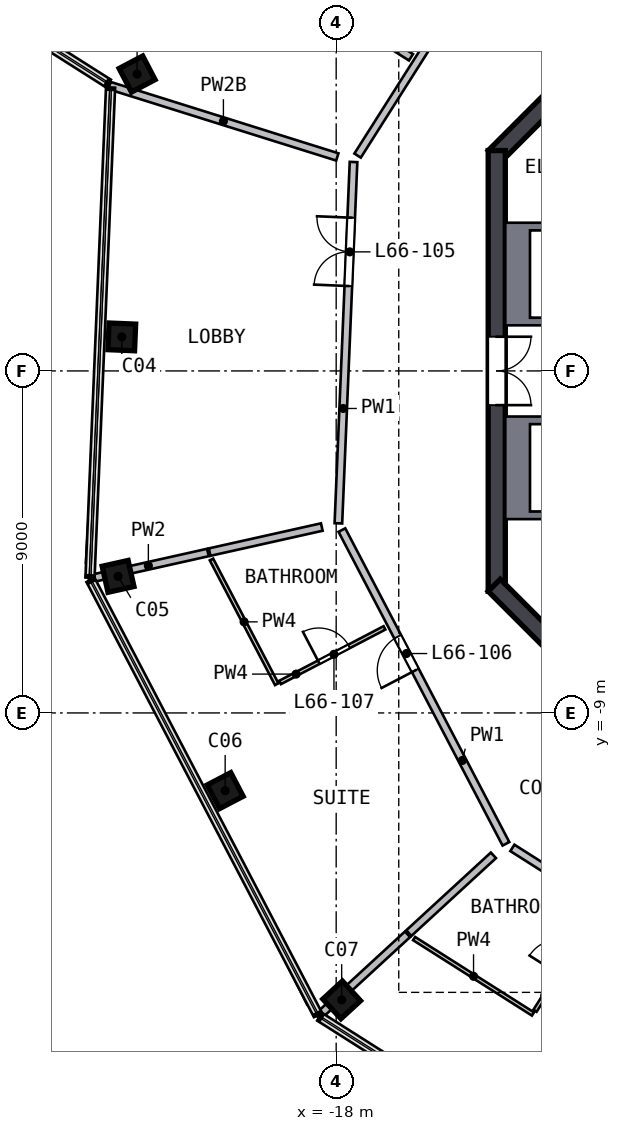
"""IFC4 building model, lengths in metres.
Left out: names, types, materials, properties, quantities, classifications, styles, units other than length and angle.
Written with IfcOpenShell. Run it as: python <this file> out.ifc"""

import sys

from ifc_helpers import new_model, si_unit, direction, frame, frame_2d, origin, origin_2d, place, context, subcontext, project, spatial, polyline, rectangle, outline, extrude, element, fill, save


model = new_model("IFC4")
c1 = context("Model", 3, precision=1e-05, world=origin(), true_north=direction((0.0, 1.0)))
c2 = subcontext(c1, "Body", "Model", "MODEL_VIEW")
j1 = project(units=[si_unit("LENGTHUNIT", "METRE"), si_unit("PLANEANGLEUNIT", "RADIAN")], contexts=[c1])
p1 = place(None, origin())
s1 = spatial("IfcSite", under=j1, at=p1, CompositionType="ELEMENT")
p2 = place(p1, origin())
s2 = spatial("IfcBuilding", under=s1, at=p2, CompositionType="ELEMENT")
p3 = place(p2, frame((0.0, 0.0, 269.0)))
s3 = spatial("IfcBuildingStorey", under=s2, at=p3, CompositionType="ELEMENT", Elevation=269.0)
p4 = place(p3, frame((-23.208, 7.906, 0.0), z_axis=(-0.02578506, -0.07771835, 0.996641856), x_axis=(-0.465171483, 0.883393066, 0.056852295)))
e1 = element("IfcColumn", 1, at=p4, inside=s3, PredefinedType="COLUMN", context=c2, shape_type="SweptSolid", body=[
    extrude(rectangle(XDim=0.7, YDim=0.7, at=origin_2d()), origin(), (0.0, 0.0, 1.0), 4.706),
])
p5 = place(p3, frame((-23.638, 0.991, 0.0), z_axis=(-0.002594671, -0.078981792, 0.996872682), x_axis=(-0.041129091, -0.996024088, -0.079021609)))
e2 = element("IfcColumn", 2, at=p5, inside=s3, PredefinedType="COLUMN", context=c2, shape_type="SweptSolid", body=[
    extrude(rectangle(XDim=0.7, YDim=0.7, at=origin_2d()), origin(), (0.0, 0.0, 1.0), 4.705),
])
p6 = place(p3, frame((-23.762, -5.311, 0.0), z_axis=(0.018418724, -0.079226457, 0.99668647), x_axis=(-0.217497759, 0.972665981, 0.081336422)))
e3 = element("IfcColumn", 3, at=p6, inside=s3, PredefinedType="COLUMN", context=c2, shape_type="SweptSolid", body=[
    extrude(rectangle(XDim=0.7, YDim=0.7, at=origin_2d()), origin(), (0.0, 0.0, 1.0), 4.706),
])
p7 = place(p3, frame((-20.966, -10.961, 0.0), z_axis=(0.037207513, -0.069744627, 0.996870748), x_axis=(0.461786436, -0.88346195, -0.079046004)))
e4 = element("IfcColumn", 4, at=p7, inside=s3, PredefinedType="COLUMN", context=c2, shape_type="SweptSolid", body=[
    extrude(rectangle(XDim=0.7, YDim=0.7, at=origin_2d()), origin(), (0.0, 0.0, 1.0), 4.705),
])
p8 = place(p3, frame((-17.923, -16.481, 0.0), z_axis=(0.055567624, -0.059355146, 0.996689122), x_axis=(-0.675008632, 0.733316452, 0.081303918)))
e5 = element("IfcColumn", 5, at=p8, inside=s3, PredefinedType="COLUMN", context=c2, shape_type="SweptSolid", body=[
    extrude(rectangle(XDim=0.7, YDim=0.7, at=origin_2d()), origin(), (0.0, 0.0, 1.0), 4.706),
])
p9 = place(p3, frame((-5.64, 13.841, 0.0), z_axis=(0.0, 0.0, 1.0), x_axis=(-0.707106781, -0.707106781, 0.0)))
e6 = element("IfcWall", 6, at=p9, inside=s3, PredefinedType="SHEAR", context=c2, shape_type="SweptSolid", body=[
    extrude(rectangle(XDim=11.598, YDim=0.45, at=frame_2d((5.799, 0.0))), origin(), (0.0, 0.0, 1.0), 5.0),
])
p10 = place(p3, frame((-13.775, 5.799, 0.0), z_axis=(0.0, 0.0, 1.0), x_axis=(0.0, -1.0, 0.0)))
e7 = element("IfcWall", 7, at=p10, inside=s3, PredefinedType="SHEAR", context=c2, shape_type="SweptSolid", body=[
    extrude(rectangle(XDim=11.598, YDim=0.45, at=frame_2d((5.799, 0.0))), origin(), (0.0, 0.0, 1.0), 5.0),
])
p11 = place(p10, frame((4.899, 0.0, 0.0)))
e8 = element("IfcOpeningElement", 8, at=p11, cuts=e7, PredefinedType="OPENING", context=c2, shape_type="SweptSolid", body=[
    extrude(rectangle(XDim=1.8, YDim=2.1, at=frame_2d((0.9, 1.05))), frame((0.0, 0.235, 0.0), z_axis=(0.0, -1.0, 0.0), x_axis=(1.0, 0.0, 0.0)), (0.0, 0.0, 1.0), 0.47),
])
p12 = place(p3, frame((-13.841, -5.64, 0.0), z_axis=(0.0, 0.0, 1.0), x_axis=(0.707106781, -0.707106781, 0.0)))
e9 = element("IfcWall", 9, at=p12, inside=s3, PredefinedType="SHEAR", context=c2, shape_type="SweptSolid", body=[
    extrude(rectangle(XDim=11.598, YDim=0.45, at=frame_2d((5.799, 0.0))), origin(), (0.0, 0.0, 1.0), 5.0),
])
p13 = place(p12, frame((2.099, 0.0, 0.0)))
e10 = element("IfcOpeningElement", 10, at=p13, cuts=e9, PredefinedType="OPENING", context=c2, shape_type="SweptSolid", body=[
    extrude(rectangle(XDim=1.2, YDim=2.1, at=frame_2d((0.6, 1.05))), frame((0.0, 0.235, 0.0), z_axis=(0.0, -1.0, 0.0), x_axis=(1.0, 0.0, 0.0)), (0.0, 0.0, 1.0), 0.47),
])
p14 = place(p3, origin())
e11 = element("IfcWall", 11, at=p14, inside=s3, PredefinedType="SOLIDWALL", context=c2, shape_type="SweptSolid", body=[
    extrude(outline(polyline([(-13.55, 3.9), (-9.9, 3.9), (-9.9, 3.7), (-12.9, 3.7), (-12.9, 1.4), (-9.9, 1.4), (-9.9, 1.2), (-13.55, 1.2), (-13.55, 3.9)])), origin(), (0.0, 0.0, 1.0), 4.69),
])
p15 = place(p3, origin())
e12 = element("IfcWall", 12, at=p15, inside=s3, PredefinedType="SOLIDWALL", context=c2, shape_type="SweptSolid", body=[
    extrude(outline(polyline([(-13.55, -3.9), (-13.55, -1.2), (-9.9, -1.2), (-9.9, -1.4), (-12.9, -1.4), (-12.9, -3.7), (-9.9, -3.7), (-9.9, -3.9), (-13.55, -3.9)])), origin(), (0.0, 0.0, 1.0), 4.69),
])
p16 = place(p3, frame((-17.942, -4.01, 0.0), z_axis=(0.0, 0.0, 1.0), x_axis=(0.041867432, 0.999123175, 0.0)))
e13 = element("IfcWall", 13, at=p16, inside=s3, PredefinedType="SOLIDWALL", context=c2, shape_type="SweptSolid", body=[
    extrude(rectangle(XDim=9.517, YDim=0.2, at=frame_2d((4.758, 0.0))), origin(), (0.0, 0.0, 1.0), 4.69),
])
p17 = place(p16, frame((6.25, 0.0, 0.0)))
e14 = element("IfcOpeningElement", 14, at=p17, cuts=e13, PredefinedType="OPENING", context=c2, shape_type="SweptSolid", body=[
    extrude(rectangle(XDim=1.8, YDim=2.1, at=frame_2d((0.9, 1.05))), frame((0.0, 0.11, 0.0), z_axis=(0.0, -1.0, 0.0), x_axis=(1.0, 0.0, 0.0)), (0.0, 0.0, 1.0), 0.22),
])
p18 = place(p3, frame((-13.533, -12.444, 0.0), z_axis=(0.0, 0.0, 1.0), x_axis=(-0.463303791, 0.886199525, 0.0)))
e15 = element("IfcWall", 15, at=p18, inside=s3, PredefinedType="SOLIDWALL", context=c2, shape_type="SweptSolid", body=[
    extrude(rectangle(XDim=9.317, YDim=0.2, at=frame_2d((4.658, 0.0))), origin(), (0.0, 0.0, 1.0), 4.69),
])
p19 = place(p18, frame((5.15, 0.0, 0.0)))
e16 = element("IfcOpeningElement", 16, at=p19, cuts=e15, PredefinedType="OPENING", context=c2, shape_type="SweptSolid", body=[
    extrude(rectangle(XDim=1.0, YDim=2.1, at=frame_2d((0.5, 1.05))), frame((0.0, 0.11, 0.0), z_axis=(0.0, -1.0, 0.0), x_axis=(1.0, 0.0, 0.0)), (0.0, 0.0, 1.0), 0.22),
])
p20 = place(p3, frame((-17.436, 5.667, 0.0), z_axis=(0.0, 0.0, 1.0), x_axis=(0.535837373, 0.844321212, 0.0)))
e17 = element("IfcWall", 17, at=p20, inside=s3, PredefinedType="SOLIDWALL", context=c2, shape_type="SweptSolid", body=[
    extrude(rectangle(XDim=9.317, YDim=0.2, at=frame_2d((4.658, 0.0))), origin(), (0.0, 0.0, 1.0), 4.69),
])
p21 = place(p20, frame((3.637, 0.0, 0.0)))
e18 = element("IfcOpeningElement", 18, at=p21, cuts=e17, PredefinedType="OPENING", context=c2, shape_type="SweptSolid", body=[
    extrude(rectangle(XDim=1.8, YDim=2.1, at=frame_2d((0.9, 1.05))), frame((0.0, 0.11, 0.0), z_axis=(0.0, -1.0, 0.0), x_axis=(1.0, 0.0, 0.0)), (0.0, 0.0, 1.0), 0.22),
])
p22 = place(p3, frame((-5.498, -17.543, 0.0), z_axis=(0.0, 0.0, 1.0), x_axis=(-0.844333068, 0.535818692, 0.0)))
e19 = element("IfcWall", 19, at=p22, inside=s3, PredefinedType="SOLIDWALL", context=c2, shape_type="SweptSolid", body=[
    extrude(rectangle(XDim=9.316, YDim=0.2, at=frame_2d((4.658, 0.0))), origin(), (0.0, 0.0, 1.0), 4.69),
])
p23 = place(p22, frame((5.15, 0.0, 0.0)))
e20 = element("IfcOpeningElement", 20, at=p23, cuts=e19, PredefinedType="OPENING", context=c2, shape_type="SweptSolid", body=[
    extrude(rectangle(XDim=1.0, YDim=2.1, at=frame_2d((0.5, 1.05))), frame((0.0, 0.11, 0.0), z_axis=(0.0, -1.0, 0.0), x_axis=(1.0, 0.0, 0.0)), (0.0, 0.0, 1.0), 0.22),
])
p24 = place(p3, frame((-21.375, -4.778, 0.0), z_axis=(0.0, 0.0, 1.0), x_axis=(-0.975907203, -0.218185999, 0.0)))
e21 = element("IfcWall", 21, at=p24, inside=s3, PredefinedType="SOLIDWALL", context=c2, shape_type="SweptSolid", body=[
    extrude(rectangle(XDim=3.211, YDim=0.2, at=frame_2d((1.606, 0.0))), origin(), (0.0, 0.0, 1.0), 4.69),
])
p25 = place(p3, frame((-17.97, 5.632, 0.0), z_axis=(0.0, 0.0, 1.0), x_axis=(-0.954248725, 0.299013997, 0.0)))
e22 = element("IfcWall", 22, at=p25, inside=s3, PredefinedType="SOLIDWALL", context=c2, shape_type="SweptSolid", body=[
    extrude(rectangle(XDim=6.282, YDim=0.2, at=frame_2d((3.141, 0.0))), origin(), (0.0, 0.0, 1.0), 4.19),
])
p26 = place(p3, frame((-16.031, 8.253, 0.0), z_axis=(0.0, 0.0, 1.0), x_axis=(-0.844319523, 0.535840034, 0.0)))
e23 = element("IfcWall", 23, at=p26, inside=s3, PredefinedType="SOLIDWALL", context=c2, shape_type="SweptSolid", body=[
    extrude(rectangle(XDim=10.302, YDim=0.2, at=frame_2d((5.151, 0.0))), origin(), (0.0, 0.0, 1.0), 4.69),
])
p27 = place(p26, frame((2.95, 0.0, 0.0)))
e24 = element("IfcOpeningElement", 24, at=p27, cuts=e23, PredefinedType="OPENING", context=c2, shape_type="SweptSolid", body=[
    extrude(rectangle(XDim=1.0, YDim=2.1, at=frame_2d((0.5, 1.05))), frame((0.0, 0.11, 0.0), z_axis=(0.0, -1.0, 0.0), x_axis=(1.0, 0.0, 0.0)), (0.0, 0.0, 1.0), 0.22),
])
p28 = place(p3, frame((-18.378, -4.108, 0.0), z_axis=(0.0, 0.0, 1.0), x_axis=(-0.975928079, -0.218092604, 0.0)))
e25 = element("IfcWall", 25, at=p28, inside=s3, PredefinedType="SOLIDWALL", context=c2, shape_type="SweptSolid", body=[
    extrude(rectangle(XDim=3.025, YDim=0.2, at=frame_2d((1.512, 0.0))), origin(), (0.0, 0.0, 1.0), 4.69),
])
p29 = place(p3, frame((-16.123, -14.825, 0.0), z_axis=(0.0, 0.0, 1.0), x_axis=(-0.736099185, -0.676873688, 0.0)))
e26 = element("IfcWall", 26, at=p29, inside=s3, PredefinedType="SOLIDWALL", context=c2, shape_type="SweptSolid", body=[
    extrude(rectangle(XDim=3.211, YDim=0.2, at=frame_2d((1.605, 0.0))), origin(), (0.0, 0.0, 1.0), 4.69),
])
p30 = place(p3, frame((-13.862, -12.747, 0.0), z_axis=(0.0, 0.0, 1.0), x_axis=(-0.736111178, -0.676860646, 0.0)))
e27 = element("IfcWall", 27, at=p30, inside=s3, PredefinedType="SOLIDWALL", context=c2, shape_type="SweptSolid", body=[
    extrude(rectangle(XDim=3.024, YDim=0.2, at=frame_2d((1.512, 0.0))), origin(), (0.0, 0.0, 1.0), 4.69),
])
p31 = place(p3, frame((-19.565, -8.244, 0.0), z_axis=(0.0, 0.0, 1.0), x_axis=(-0.463302447, 0.886200227, 0.0)))
e28 = element("IfcWall", 28, at=p31, inside=s3, PredefinedType="PARTITIONING", context=c2, shape_type="SweptSolid", body=[
    extrude(rectangle(XDim=3.704, YDim=0.1, at=frame_2d((1.852, 0.0))), origin(), (0.0, 0.0, 1.0), 4.69),
])
p32 = place(p3, frame((-19.477, -8.198, 0.0), z_axis=(0.0, 0.0, 1.0), x_axis=(0.886184288, 0.463332934, 0.0)))
e29 = element("IfcWall", 29, at=p32, inside=s3, PredefinedType="PARTITIONING", context=c2, shape_type="SweptSolid", body=[
    extrude(rectangle(XDim=3.1, YDim=0.1, at=frame_2d((1.55, 0.0))), origin(), (0.0, 0.0, 1.0), 4.69),
])
p33 = place(p32, frame((1.15, 0.0, 0.0)))
e30 = element("IfcOpeningElement", 30, at=p33, cuts=e29, PredefinedType="OPENING", context=c2, shape_type="SweptSolid", body=[
    extrude(rectangle(XDim=0.9, YDim=2.1, at=frame_2d((0.45, 1.05))), frame((0.0, 0.06, 0.0), z_axis=(0.0, -1.0, 0.0), x_axis=(1.0, 0.0, 0.0)), (0.0, 0.0, 1.0), 0.12),
])
p34 = place(p3, frame((-12.822, -16.922, 0.0), z_axis=(0.0, 0.0, 1.0), x_axis=(-0.844342036, 0.53580456, 0.0)))
e31 = element("IfcWall", 31, at=p34, inside=s3, PredefinedType="PARTITIONING", context=c2, shape_type="SweptSolid", body=[
    extrude(rectangle(XDim=3.704, YDim=0.1, at=frame_2d((1.852, 0.0))), origin(), (0.0, 0.0, 1.0), 4.69),
])
p35 = place(p3, frame((-12.768, -16.838, 0.0), z_axis=(0.0, 0.0, 1.0), x_axis=(0.535876266, 0.844296528, 0.0)))
e32 = element("IfcWall", 32, at=p35, inside=s3, PredefinedType="PARTITIONING", context=c2, shape_type="SweptSolid", body=[
    extrude(rectangle(XDim=3.1, YDim=0.1, at=frame_2d((1.55, 0.0))), origin(), (0.0, 0.0, 1.0), 4.69),
])
p36 = place(p35, frame((1.15, 0.0, 0.0)))
e33 = element("IfcOpeningElement", 33, at=p36, cuts=e32, PredefinedType="OPENING", context=c2, shape_type="SweptSolid", body=[
    extrude(rectangle(XDim=0.9, YDim=2.1, at=frame_2d((0.45, 1.05))), frame((0.0, 0.06, 0.0), z_axis=(0.0, -1.0, 0.0), x_axis=(1.0, 0.0, 0.0)), (0.0, 0.0, 1.0), 0.12),
])
p37 = place(p11, origin())
e34 = element("IfcDoor", 34, at=p37, inside=s3, OperationType="DOUBLE_DOOR_SINGLE_SWING", PredefinedType="DOOR", context=c2, shape_type="SweptSolid", body=[
    extrude(rectangle(XDim=1.8, YDim=2.1, at=frame_2d((0.9, 1.05))), frame((0.0, 0.025, 0.0), z_axis=(0.0, -1.0, 0.0), x_axis=(1.0, 0.0, 0.0)), (0.0, 0.0, 1.0), 0.05),
])
fill(e8, e34)
p38 = place(p17, origin())
e35 = element("IfcDoor", 35, at=p38, inside=s3, OperationType="DOUBLE_DOOR_SINGLE_SWING", PredefinedType="DOOR", context=c2, shape_type="SweptSolid", body=[
    extrude(rectangle(XDim=1.8, YDim=2.1, at=frame_2d((0.9, 1.05))), frame((0.0, 0.025, 0.0), z_axis=(0.0, -1.0, 0.0), x_axis=(1.0, 0.0, 0.0)), (0.0, 0.0, 1.0), 0.05),
])
fill(e14, e35)
p39 = place(p19, origin())
e36 = element("IfcDoor", 36, at=p39, inside=s3, OperationType="SINGLE_SWING_LEFT", PredefinedType="DOOR", context=c2, shape_type="SweptSolid", body=[
    extrude(rectangle(XDim=1.0, YDim=2.1, at=frame_2d((0.5, 1.05))), frame((0.0, 0.025, 0.0), z_axis=(0.0, -1.0, 0.0), x_axis=(1.0, 0.0, 0.0)), (0.0, 0.0, 1.0), 0.05),
])
fill(e16, e36)
p40 = place(p33, origin())
e37 = element("IfcDoor", 37, at=p40, inside=s3, OperationType="SINGLE_SWING_LEFT", PredefinedType="DOOR", context=c2, shape_type="SweptSolid", body=[
    extrude(rectangle(XDim=0.9, YDim=2.1, at=frame_2d((0.45, 1.05))), frame((0.0, 0.025, 0.0), z_axis=(0.0, -1.0, 0.0), x_axis=(1.0, 0.0, 0.0)), (0.0, 0.0, 1.0), 0.05),
])
fill(e30, e37)
save(model, sys.argv[1])
